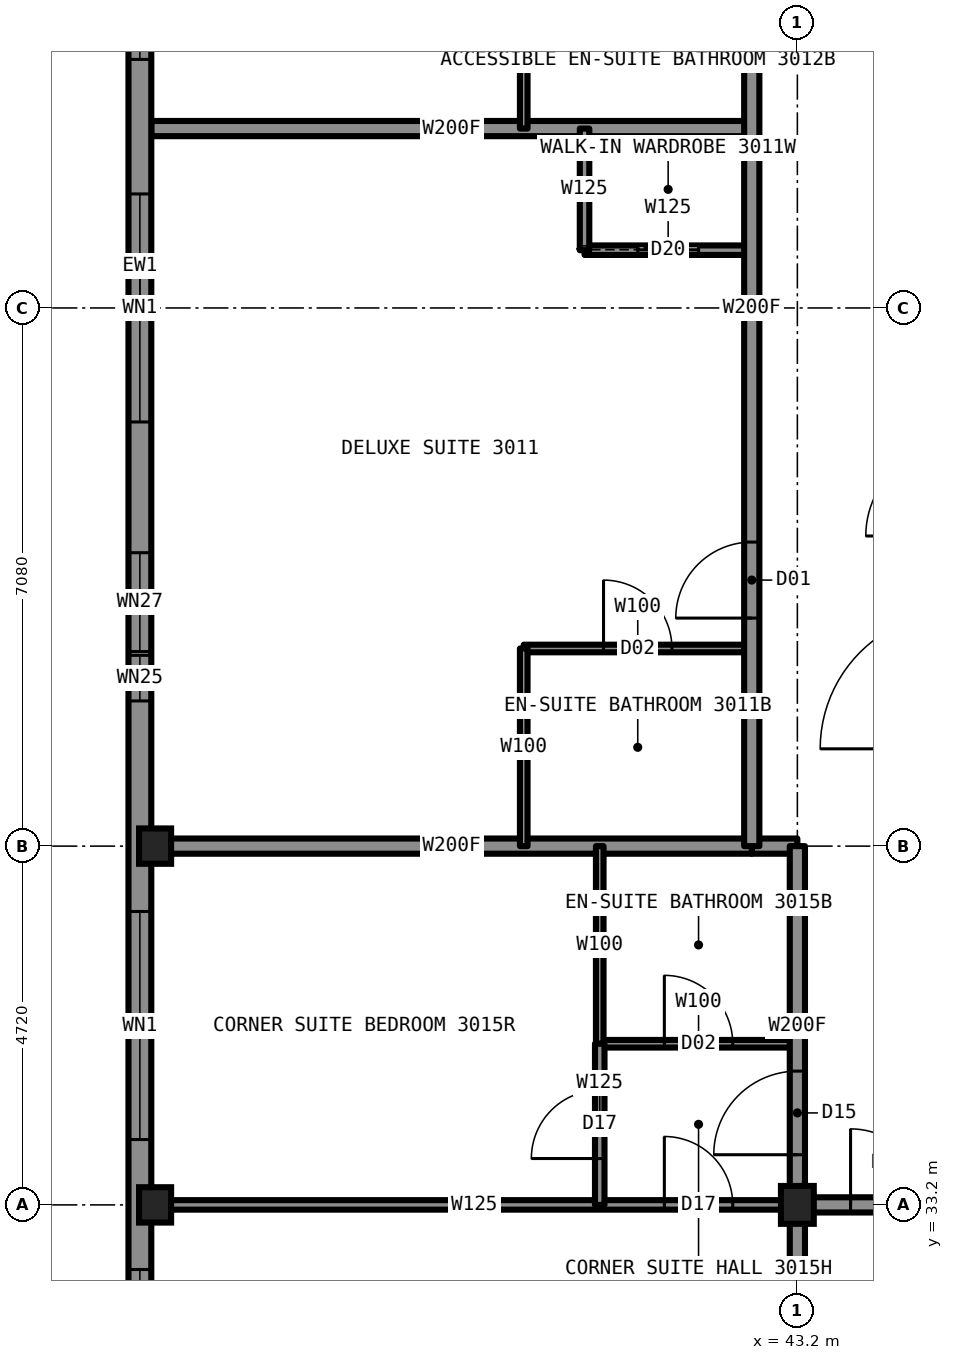
"""IFC4 building model, lengths in metres.
Left out: names, types, materials, properties, quantities, classifications, styles, units other than length and angle.
Written with IfcOpenShell. Run it as: python <this file> out.ifc"""

import sys

from ifc_helpers import new_model, si_unit, direction, frame, frame_2d, origin, origin_2d, place, context, subcontext, project, spatial, rectangle, i_section, extrude, element, fill, save


model = new_model("IFC4")
c1 = context("Model", 3, precision=1e-05, world=origin(), true_north=direction((0.0, 1.0)))
c2 = subcontext(c1, "Body", "Model", "MODEL_VIEW")
j1 = project(units=[si_unit("LENGTHUNIT", "METRE"), si_unit("PLANEANGLEUNIT", "RADIAN")], contexts=[c1])
p1 = place(None, origin())
s1 = spatial("IfcSite", under=j1, at=p1, CompositionType="ELEMENT")
p2 = place(p1, origin())
s2 = spatial("IfcBuilding", under=s1, at=p2, CompositionType="ELEMENT")
p3 = place(p2, frame((0.0, 0.0, 114.4)))
s3 = spatial("IfcBuildingStorey", under=s2, at=p3, CompositionType="ELEMENT", Elevation=114.4)
for number, where, z_axis, x_axis in (
    (1, (34.75, 33.2, 0.0), (0.0, 0.0, 1.0), (1.0, 0.0, 0.0)),
    (2, (34.75, 37.92, 0.0), (0.0, 0.0, 1.0), (1.0, 0.0, 0.0)),
):
    element("IfcColumn", number, at=place(p3, frame(where, z_axis=z_axis, x_axis=x_axis)), inside=s3, PredefinedType="COLUMN", context=c2, shape_type="SweptSolid", body=[
        extrude(i_section(OverallWidth=0.422, OverallDepth=0.465, WebThickness=0.045, FlangeThickness=0.073, at=origin_2d()), origin(), (0.0, 0.0, 1.0), 3.5),
    ])
p4 = place(p3, frame((43.2, 33.2, 0.0), z_axis=(0.0, 0.0, 1.0), x_axis=(1.0, 0.0, 0.0)))
e3 = element("IfcColumn", 3, at=p4, inside=s3, PredefinedType="COLUMN", context=c2, shape_type="SweptSolid", body=[
    extrude(i_section(OverallWidth=0.432, OverallDepth=0.498, WebThickness=0.056, FlangeThickness=0.089, at=origin_2d()), origin(), (0.0, 0.0, 1.0), 3.5),
])
p5 = place(p3, frame((43.2, 33.2, 0.0), z_axis=(0.0, 0.0, 1.0), x_axis=(1.0, 0.0, 0.0)))
e4 = element("IfcWall", 4, at=p5, inside=s3, PredefinedType="PARTITIONING", context=c2, shape_type="SweptSolid", body=[
    extrude(rectangle(XDim=23.6, YDim=0.2, at=frame_2d((11.8, 0.0))), origin(), (0.0, 0.0, 1.0), 3.33),
])
p6 = place(p5, frame((0.7, 0.0, 0.0)))
e5 = element("IfcOpeningElement", 5, at=p6, cuts=e4, PredefinedType="OPENING", context=c2, shape_type="SweptSolid", body=[
    extrude(rectangle(XDim=1.0, YDim=2.2, at=frame_2d((0.5, 1.1))), frame((0.0, 0.11, 0.0), z_axis=(0.0, -1.0, 0.0), x_axis=(1.0, 0.0, 0.0)), (0.0, 0.0, 1.0), 0.22),
])
p7 = place(p5, frame((6.57, 0.0, 0.0)))
e6 = element("IfcOpeningElement", 6, at=p7, cuts=e4, PredefinedType="OPENING", context=c2, shape_type="SweptSolid", body=[
    extrude(rectangle(XDim=1.1, YDim=2.2, at=frame_2d((0.55, 1.1))), frame((0.0, 0.11, 0.0), z_axis=(0.0, -1.0, 0.0), x_axis=(1.0, 0.0, 0.0)), (0.0, 0.0, 1.0), 0.22),
])
p8 = place(p5, frame((20.34, 0.0, 0.0)))
e7 = element("IfcOpeningElement", 7, at=p8, cuts=e4, PredefinedType="OPENING", context=c2, shape_type="SweptSolid", body=[
    extrude(rectangle(XDim=1.0, YDim=2.2, at=frame_2d((0.5, 1.1))), frame((0.0, 0.11, 0.0), z_axis=(0.0, -1.0, 0.0), x_axis=(1.0, 0.0, 0.0)), (0.0, 0.0, 1.0), 0.22),
])
p9 = place(p3, frame((34.7, 33.2, 0.0), z_axis=(0.0, 0.0, 1.0), x_axis=(1.0, 0.0, 0.0)))
e8 = element("IfcWall", 8, at=p9, inside=s3, PredefinedType="PARTITIONING", context=c2, shape_type="SweptSolid", body=[
    extrude(rectangle(XDim=8.5, YDim=0.125, at=frame_2d((4.25, 0.0))), origin(), (0.0, 0.0, 1.0), 2.573),
])
p10 = place(p9, frame((6.75, 0.0, 0.0)))
e9 = element("IfcOpeningElement", 9, at=p10, cuts=e8, PredefinedType="OPENING", context=c2, shape_type="SweptSolid", body=[
    extrude(rectangle(XDim=0.9, YDim=2.2, at=frame_2d((0.45, 1.1))), frame((0.0, 0.073, 0.0), z_axis=(0.0, -1.0, 0.0), x_axis=(1.0, 0.0, 0.0)), (0.0, 0.0, 1.0), 0.145),
])
p11 = place(p3, frame((39.6, 40.52, 0.0), z_axis=(0.0, 0.0, 1.0), x_axis=(1.0, 0.0, 0.0)))
e10 = element("IfcWall", 10, at=p11, inside=s3, PredefinedType="PARTITIONING", context=c2, shape_type="SweptSolid", body=[
    extrude(rectangle(XDim=3.0, YDim=0.1, at=frame_2d((1.5, 0.0))), origin(), (0.0, 0.0, 1.0), 3.33),
])
p12 = place(p11, frame((1.05, 0.0, 0.0)))
e11 = element("IfcOpeningElement", 11, at=p12, cuts=e10, PredefinedType="OPENING", context=c2, shape_type="SweptSolid", body=[
    extrude(rectangle(XDim=0.9, YDim=2.1, at=frame_2d((0.45, 1.05))), frame((0.0, 0.06, 0.0), z_axis=(0.0, -1.0, 0.0), x_axis=(1.0, 0.0, 0.0)), (0.0, 0.0, 1.0), 0.12),
])
p13 = place(p3, frame((42.6, 37.92, 0.0), z_axis=(0.0, 0.0, 1.0), x_axis=(1.0, 0.0, 0.0)))
e12 = element("IfcWall", 12, at=p13, inside=s3, PredefinedType="PARTITIONING", context=c2, shape_type="SweptSolid", body=[
    extrude(rectangle(XDim=0.6, YDim=0.2, at=frame_2d((0.3, 0.0))), origin(), (0.0, 0.0, 1.0), 2.573),
])
p14 = place(p3, frame((34.7, 37.92, 0.0), z_axis=(0.0, 0.0, 1.0), x_axis=(1.0, 0.0, 0.0)))
e13 = element("IfcWall", 13, at=p14, inside=s3, PredefinedType="PARTITIONING", context=c2, shape_type="SweptSolid", body=[
    extrude(rectangle(XDim=7.9, YDim=0.2, at=frame_2d((3.95, 0.0))), origin(), (0.0, 0.0, 1.0), 2.573),
])
p15 = place(p3, frame((40.6, 35.32, 0.0), z_axis=(0.0, 0.0, 1.0), x_axis=(1.0, 0.0, 0.0)))
e14 = element("IfcWall", 14, at=p15, inside=s3, PredefinedType="PARTITIONING", context=c2, shape_type="SweptSolid", body=[
    extrude(rectangle(XDim=2.6, YDim=0.1, at=frame_2d((1.3, 0.0))), origin(), (0.0, 0.0, 1.0), 3.33),
])
p16 = place(p15, frame((0.85, 0.0, 0.0)))
e15 = element("IfcOpeningElement", 15, at=p16, cuts=e14, PredefinedType="OPENING", context=c2, shape_type="SweptSolid", body=[
    extrude(rectangle(XDim=0.9, YDim=2.1, at=frame_2d((0.45, 1.05))), frame((0.0, 0.06, 0.0), z_axis=(0.0, -1.0, 0.0), x_axis=(1.0, 0.0, 0.0)), (0.0, 0.0, 1.0), 0.12),
])
p17 = place(p3, frame((40.4, 45.76, 0.0), z_axis=(0.0, 0.0, 1.0), x_axis=(1.0, 0.0, 0.0)))
e16 = element("IfcWall", 16, at=p17, inside=s3, PredefinedType="PARTITIONING", context=c2, shape_type="SweptSolid", body=[
    extrude(rectangle(XDim=2.2, YDim=0.125, at=frame_2d((1.1, 0.0))), origin(), (0.0, 0.0, 1.0), 3.33),
])
p18 = place(p17, frame((0.7, 0.0, 0.0)))
e17 = element("IfcOpeningElement", 17, at=p18, cuts=e16, PredefinedType="OPENING", context=c2, shape_type="SweptSolid", body=[
    extrude(rectangle(XDim=0.8, YDim=2.1, at=frame_2d((0.4, 1.05))), frame((0.0, 0.073, 0.0), z_axis=(0.0, -1.0, 0.0), x_axis=(1.0, 0.0, 0.0)), (0.0, 0.0, 1.0), 0.145),
])
p19 = place(p3, frame((34.7, 47.36, 0.0), z_axis=(0.0, 0.0, 1.0), x_axis=(1.0, 0.0, 0.0)))
e18 = element("IfcWall", 18, at=p19, inside=s3, PredefinedType="PARTITIONING", context=c2, shape_type="SweptSolid", body=[
    extrude(rectangle(XDim=7.9, YDim=0.2, at=frame_2d((3.95, 0.0))), origin(), (0.0, 0.0, 1.0), 2.731),
])
p20 = place(p3, frame((43.2, 33.2, 0.0), z_axis=(0.0, 0.0, 1.0), x_axis=(0.0, 1.0, 0.0)))
e19 = element("IfcWall", 19, at=p20, inside=s3, PredefinedType="PARTITIONING", context=c2, shape_type="SweptSolid", body=[
    extrude(rectangle(XDim=4.72, YDim=0.2, at=frame_2d((2.36, 0.0))), origin(), (0.0, 0.0, 1.0), 3.33),
])
p21 = place(p20, frame((0.66, 0.0, 0.0)))
e20 = element("IfcOpeningElement", 20, at=p21, cuts=e19, PredefinedType="OPENING", context=c2, shape_type="SweptSolid", body=[
    extrude(rectangle(XDim=1.1, YDim=2.2, at=frame_2d((0.55, 1.1))), frame((0.0, 0.11, 0.0), z_axis=(0.0, -1.0, 0.0), x_axis=(1.0, 0.0, 0.0)), (0.0, 0.0, 1.0), 0.22),
])
p22 = place(p3, frame((43.2, 24.7, 0.0), z_axis=(0.0, 0.0, 1.0), x_axis=(0.0, 1.0, 0.0)))
e21 = element("IfcWall", 21, at=p22, inside=s3, PredefinedType="PARTITIONING", context=c2, shape_type="SweptSolid", body=[
    extrude(rectangle(XDim=8.5, YDim=0.2, at=frame_2d((4.25, 0.0))), origin(), (0.0, 0.0, 1.0), 2.573),
])
p23 = place(p3, frame((42.6, 37.92, 0.0), z_axis=(0.0, 0.0, 1.0), x_axis=(0.0, 1.0, 0.0)))
e22 = element("IfcWall", 22, at=p23, inside=s3, PredefinedType="PARTITIONING", context=c2, shape_type="SweptSolid", body=[
    extrude(rectangle(XDim=14.16, YDim=0.2, at=frame_2d((7.08, 0.0))), origin(), (0.0, 0.0, 1.0), 3.33),
])
p24 = place(p23, frame((3.0, 0.0, 0.0)))
e23 = element("IfcOpeningElement", 23, at=p24, cuts=e22, PredefinedType="OPENING", context=c2, shape_type="SweptSolid", body=[
    extrude(rectangle(XDim=1.0, YDim=2.2, at=frame_2d((0.5, 1.1))), frame((0.0, 0.11, 0.0), z_axis=(0.0, -1.0, 0.0), x_axis=(1.0, 0.0, 0.0)), (0.0, 0.0, 1.0), 0.22),
])
p25 = place(p23, frame((12.59, 0.0, 0.0)))
e24 = element("IfcOpeningElement", 24, at=p25, cuts=e22, PredefinedType="OPENING", context=c2, shape_type="SweptSolid", body=[
    extrude(rectangle(XDim=1.0, YDim=2.2, at=frame_2d((0.5, 1.1))), frame((0.0, 0.11, 0.0), z_axis=(0.0, -1.0, 0.0), x_axis=(1.0, 0.0, 0.0)), (0.0, 0.0, 1.0), 0.22),
])
p26 = place(p3, frame((40.6, 35.32, 0.0), z_axis=(0.0, 0.0, 1.0), x_axis=(0.0, 1.0, 0.0)))
e25 = element("IfcWall", 25, at=p26, inside=s3, PredefinedType="PARTITIONING", context=c2, shape_type="SweptSolid", body=[
    extrude(rectangle(XDim=2.6, YDim=0.1, at=frame_2d((1.3, 0.0))), origin(), (0.0, 0.0, 1.0), 3.33),
])
p27 = place(p3, frame((40.6, 33.2, 0.0), z_axis=(0.0, 0.0, 1.0), x_axis=(0.0, 1.0, 0.0)))
e26 = element("IfcWall", 26, at=p27, inside=s3, PredefinedType="PARTITIONING", context=c2, shape_type="SweptSolid", body=[
    extrude(rectangle(XDim=2.12, YDim=0.125, at=frame_2d((1.06, 0.0))), origin(), (0.0, 0.0, 1.0), 3.33),
])
p28 = place(p27, frame((0.61, 0.0, 0.0)))
e27 = element("IfcOpeningElement", 27, at=p28, cuts=e26, PredefinedType="OPENING", context=c2, shape_type="SweptSolid", body=[
    extrude(rectangle(XDim=0.9, YDim=2.2, at=frame_2d((0.45, 1.1))), frame((0.0, 0.073, 0.0), z_axis=(0.0, -1.0, 0.0), x_axis=(1.0, 0.0, 0.0)), (0.0, 0.0, 1.0), 0.145),
])
p29 = place(p3, frame((40.4, 45.76, 0.0), z_axis=(0.0, 0.0, 1.0), x_axis=(0.0, 1.0, 0.0)))
e28 = element("IfcWall", 28, at=p29, inside=s3, PredefinedType="PARTITIONING", context=c2, shape_type="SweptSolid", body=[
    extrude(rectangle(XDim=1.6, YDim=0.125, at=frame_2d((0.8, 0.0))), origin(), (0.0, 0.0, 1.0), 3.33),
])
p30 = place(p3, frame((39.6, 37.92, 0.0), z_axis=(0.0, 0.0, 1.0), x_axis=(0.0, 1.0, 0.0)))
e29 = element("IfcWall", 29, at=p30, inside=s3, PredefinedType="PARTITIONING", context=c2, shape_type="SweptSolid", body=[
    extrude(rectangle(XDim=2.6, YDim=0.1, at=frame_2d((1.3, 0.0))), origin(), (0.0, 0.0, 1.0), 3.33),
])
p31 = place(p3, frame((39.6, 47.36, 0.0), z_axis=(0.0, 0.0, 1.0), x_axis=(0.0, 1.0, 0.0)))
e30 = element("IfcWall", 30, at=p31, inside=s3, PredefinedType="PARTITIONING", context=c2, shape_type="SweptSolid", body=[
    extrude(rectangle(XDim=2.9, YDim=0.1, at=frame_2d((1.45, 0.0))), origin(), (0.0, 0.0, 1.0), 3.33),
])
p32 = place(p3, frame((34.55, 60.1, 0.0), z_axis=(0.0, 0.0, 1.0), x_axis=(0.0, -1.0, 0.0)))
e31 = element("IfcWall", 31, at=p32, inside=s3, PredefinedType="SOLIDWALL", context=c2, shape_type="SweptSolid", body=[
    extrude(rectangle(XDim=30.2, YDim=0.3, at=frame_2d((15.1, 0.0))), origin(), (0.0, 0.0, 1.0), 2.83),
])
p33 = place(p32, frame((0.85, 0.0, 0.5)))
e32 = element("IfcOpeningElement", 32, at=p33, cuts=e31, PredefinedType="OPENING", context=c2, shape_type="SweptSolid", body=[
    extrude(rectangle(XDim=1.6, YDim=2.0, at=frame_2d((0.8, 1.0))), frame((0.0, 0.16, 0.0), z_axis=(0.0, -1.0, 0.0), x_axis=(1.0, 0.0, 0.0)), (0.0, 0.0, 1.0), 0.32),
])
p34 = place(p32, frame((4.16, 0.0, 0.5)))
e33 = element("IfcOpeningElement", 33, at=p34, cuts=e31, PredefinedType="OPENING", context=c2, shape_type="SweptSolid", body=[
    extrude(rectangle(XDim=3.0, YDim=2.0, at=frame_2d((1.5, 1.0))), frame((0.0, 0.16, 0.0), z_axis=(0.0, -1.0, 0.0), x_axis=(1.0, 0.0, 0.0)), (0.0, 0.0, 1.0), 0.32),
])
p35 = place(p32, frame((10.53, 0.0, 0.5)))
e34 = element("IfcOpeningElement", 34, at=p35, cuts=e31, PredefinedType="OPENING", context=c2, shape_type="SweptSolid", body=[
    extrude(rectangle(XDim=1.3, YDim=1.9, at=frame_2d((0.65, 0.95))), frame((0.0, 0.16, 0.0), z_axis=(0.0, -1.0, 0.0), x_axis=(1.0, 0.0, 0.0)), (0.0, 0.0, 1.0), 0.32),
])
p36 = place(p32, frame((13.6, 0.0, 0.5)))
e35 = element("IfcOpeningElement", 35, at=p36, cuts=e31, PredefinedType="OPENING", context=c2, shape_type="SweptSolid", body=[
    extrude(rectangle(XDim=3.0, YDim=2.0, at=frame_2d((1.5, 1.0))), frame((0.0, 0.16, 0.0), z_axis=(0.0, -1.0, 0.0), x_axis=(1.0, 0.0, 0.0)), (0.0, 0.0, 1.0), 0.32),
])
p37 = place(p32, frame((18.32, 0.0, 0.5)))
e36 = element("IfcOpeningElement", 36, at=p37, cuts=e31, PredefinedType="OPENING", context=c2, shape_type="SweptSolid", body=[
    extrude(rectangle(XDim=1.3, YDim=1.9, at=frame_2d((0.65, 0.95))), frame((0.0, 0.16, 0.0), z_axis=(0.0, -1.0, 0.0), x_axis=(1.0, 0.0, 0.0)), (0.0, 0.0, 1.0), 0.32),
])
p38 = place(p32, frame((23.04, 0.0, 0.5)))
e37 = element("IfcOpeningElement", 37, at=p38, cuts=e31, PredefinedType="OPENING", context=c2, shape_type="SweptSolid", body=[
    extrude(rectangle(XDim=3.0, YDim=2.0, at=frame_2d((1.5, 1.0))), frame((0.0, 0.16, 0.0), z_axis=(0.0, -1.0, 0.0), x_axis=(1.0, 0.0, 0.0)), (0.0, 0.0, 1.0), 0.32),
])
p39 = place(p32, frame((27.75, 0.0, 0.5)))
e38 = element("IfcOpeningElement", 38, at=p39, cuts=e31, PredefinedType="OPENING", context=c2, shape_type="SweptSolid", body=[
    extrude(rectangle(XDim=1.6, YDim=2.0, at=frame_2d((0.8, 1.0))), frame((0.0, 0.16, 0.0), z_axis=(0.0, -1.0, 0.0), x_axis=(1.0, 0.0, 0.0)), (0.0, 0.0, 1.0), 0.32),
])
p40 = place(p32, frame((9.88, 0.0, 0.5)))
e39 = element("IfcOpeningElement", 39, at=p40, cuts=e31, PredefinedType="OPENING", context=c2, shape_type="SweptSolid", body=[
    extrude(rectangle(XDim=0.6, YDim=0.9, at=frame_2d((0.3, 0.45))), frame((0.0, 0.16, 0.0), z_axis=(0.0, -1.0, 0.0), x_axis=(1.0, 0.0, 0.0)), (0.0, 0.0, 1.0), 0.32),
])
p41 = place(p32, frame((19.67, 0.0, 0.5)))
e40 = element("IfcOpeningElement", 40, at=p41, cuts=e31, PredefinedType="OPENING", context=c2, shape_type="SweptSolid", body=[
    extrude(rectangle(XDim=0.6, YDim=0.9, at=frame_2d((0.3, 0.45))), frame((0.0, 0.16, 0.0), z_axis=(0.0, -1.0, 0.0), x_axis=(1.0, 0.0, 0.0)), (0.0, 0.0, 1.0), 0.32),
])
p42 = place(p6, origin())
e41 = element("IfcDoor", 41, at=p42, inside=s3, OperationType="SINGLE_SWING_LEFT", PredefinedType="DOOR", context=c2, shape_type="SweptSolid", body=[
    extrude(rectangle(XDim=1.0, YDim=2.2, at=frame_2d((0.5, 1.1))), frame((0.0, 0.025, 0.0), z_axis=(0.0, -1.0, 0.0), x_axis=(1.0, 0.0, 0.0)), (0.0, 0.0, 1.0), 0.05),
])
fill(e5, e41)
p43 = place(p24, origin())
e42 = element("IfcDoor", 42, at=p43, inside=s3, OperationType="SINGLE_SWING_LEFT", PredefinedType="DOOR", context=c2, shape_type="SweptSolid", body=[
    extrude(rectangle(XDim=1.0, YDim=2.2, at=frame_2d((0.5, 1.1))), frame((0.0, 0.025, 0.0), z_axis=(0.0, -1.0, 0.0), x_axis=(1.0, 0.0, 0.0)), (0.0, 0.0, 1.0), 0.05),
])
fill(e23, e42)
p44 = place(p12, origin())
e43 = element("IfcDoor", 43, at=p44, inside=s3, OperationType="SINGLE_SWING_RIGHT", PredefinedType="DOOR", context=c2, shape_type="SweptSolid", body=[
    extrude(rectangle(XDim=0.9, YDim=2.1, at=frame_2d((0.45, 1.05))), frame((0.0, 0.025, 0.0), z_axis=(0.0, -1.0, 0.0), x_axis=(1.0, 0.0, 0.0)), (0.0, 0.0, 1.0), 0.05),
])
fill(e11, e43)
p45 = place(p18, origin())
e44 = element("IfcDoor", 44, at=p45, inside=s3, OperationType="SLIDING_TO_LEFT", PredefinedType="DOOR", context=c2, shape_type="SweptSolid", body=[
    extrude(rectangle(XDim=0.8, YDim=2.1, at=frame_2d((0.4, 1.05))), frame((0.0, 0.025, 0.0), z_axis=(0.0, -1.0, 0.0), x_axis=(1.0, 0.0, 0.0)), (0.0, 0.0, 1.0), 0.05),
])
fill(e17, e44)
p46 = place(p10, origin())
e45 = element("IfcDoor", 45, at=p46, inside=s3, OperationType="SINGLE_SWING_LEFT", PredefinedType="DOOR", context=c2, shape_type="SweptSolid", body=[
    extrude(rectangle(XDim=0.9, YDim=2.2, at=frame_2d((0.45, 1.1))), frame((0.0, 0.025, 0.0), z_axis=(0.0, -1.0, 0.0), x_axis=(1.0, 0.0, 0.0)), (0.0, 0.0, 1.0), 0.05),
])
fill(e9, e45)
p47 = place(p16, origin())
e46 = element("IfcDoor", 46, at=p47, inside=s3, OperationType="SINGLE_SWING_RIGHT", PredefinedType="DOOR", context=c2, shape_type="SweptSolid", body=[
    extrude(rectangle(XDim=0.9, YDim=2.1, at=frame_2d((0.45, 1.05))), frame((0.0, 0.025, 0.0), z_axis=(0.0, -1.0, 0.0), x_axis=(1.0, 0.0, 0.0)), (0.0, 0.0, 1.0), 0.05),
])
fill(e15, e46)
p48 = place(p21, origin())
e47 = element("IfcDoor", 47, at=p48, inside=s3, OperationType="SINGLE_SWING_LEFT", PredefinedType="DOOR", context=c2, shape_type="SweptSolid", body=[
    extrude(rectangle(XDim=1.1, YDim=2.2, at=frame_2d((0.55, 1.1))), frame((0.0, 0.025, 0.0), z_axis=(0.0, -1.0, 0.0), x_axis=(1.0, 0.0, 0.0)), (0.0, 0.0, 1.0), 0.05),
])
fill(e20, e47)
p49 = place(p28, origin())
e48 = element("IfcDoor", 48, at=p49, inside=s3, OperationType="SINGLE_SWING_LEFT", PredefinedType="DOOR", context=c2, shape_type="SweptSolid", body=[
    extrude(rectangle(XDim=0.9, YDim=2.2, at=frame_2d((0.45, 1.1))), frame((0.0, 0.025, 0.0), z_axis=(0.0, -1.0, 0.0), x_axis=(1.0, 0.0, 0.0)), (0.0, 0.0, 1.0), 0.05),
])
fill(e27, e48)
p50 = place(p35, origin())
e49 = element("IfcWindow", 49, at=p50, inside=s3, PartitioningType="SINGLE_PANEL", PredefinedType="WINDOW", context=c2, shape_type="SweptSolid", body=[
    extrude(rectangle(XDim=1.3, YDim=1.9, at=frame_2d((0.65, 0.95))), frame((0.0, 0.03, 0.0), z_axis=(0.0, -1.0, 0.0), x_axis=(1.0, 0.0, 0.0)), (0.0, 0.0, 1.0), 0.06),
])
fill(e34, e49)
p51 = place(p36, origin())
e50 = element("IfcWindow", 50, at=p51, inside=s3, PartitioningType="SINGLE_PANEL", PredefinedType="WINDOW", context=c2, shape_type="SweptSolid", body=[
    extrude(rectangle(XDim=3.0, YDim=2.0, at=frame_2d((1.5, 1.0))), frame((0.0, 0.03, 0.0), z_axis=(0.0, -1.0, 0.0), x_axis=(1.0, 0.0, 0.0)), (0.0, 0.0, 1.0), 0.06),
])
fill(e35, e50)
p52 = place(p37, origin())
e51 = element("IfcWindow", 51, at=p52, inside=s3, PartitioningType="SINGLE_PANEL", PredefinedType="WINDOW", context=c2, shape_type="SweptSolid", body=[
    extrude(rectangle(XDim=1.3, YDim=1.9, at=frame_2d((0.65, 0.95))), frame((0.0, 0.03, 0.0), z_axis=(0.0, -1.0, 0.0), x_axis=(1.0, 0.0, 0.0)), (0.0, 0.0, 1.0), 0.06),
])
fill(e36, e51)
p53 = place(p38, origin())
e52 = element("IfcWindow", 52, at=p53, inside=s3, PartitioningType="SINGLE_PANEL", PredefinedType="WINDOW", context=c2, shape_type="SweptSolid", body=[
    extrude(rectangle(XDim=3.0, YDim=2.0, at=frame_2d((1.5, 1.0))), frame((0.0, 0.03, 0.0), z_axis=(0.0, -1.0, 0.0), x_axis=(1.0, 0.0, 0.0)), (0.0, 0.0, 1.0), 0.06),
])
fill(e37, e52)
p54 = place(p39, origin())
e53 = element("IfcWindow", 53, at=p54, inside=s3, PartitioningType="SINGLE_PANEL", PredefinedType="WINDOW", context=c2, shape_type="SweptSolid", body=[
    extrude(rectangle(XDim=1.6, YDim=2.0, at=frame_2d((0.8, 1.0))), frame((0.0, 0.03, 0.0), z_axis=(0.0, -1.0, 0.0), x_axis=(1.0, 0.0, 0.0)), (0.0, 0.0, 1.0), 0.06),
])
fill(e38, e53)
p55 = place(p41, origin())
e54 = element("IfcWindow", 54, at=p55, inside=s3, PartitioningType="SINGLE_PANEL", PredefinedType="WINDOW", context=c2, shape_type="SweptSolid", body=[
    extrude(rectangle(XDim=0.6, YDim=0.9, at=frame_2d((0.3, 0.45))), frame((0.0, 0.03, 0.0), z_axis=(0.0, -1.0, 0.0), x_axis=(1.0, 0.0, 0.0)), (0.0, 0.0, 1.0), 0.06),
])
fill(e40, e54)
save(model, sys.argv[1])
